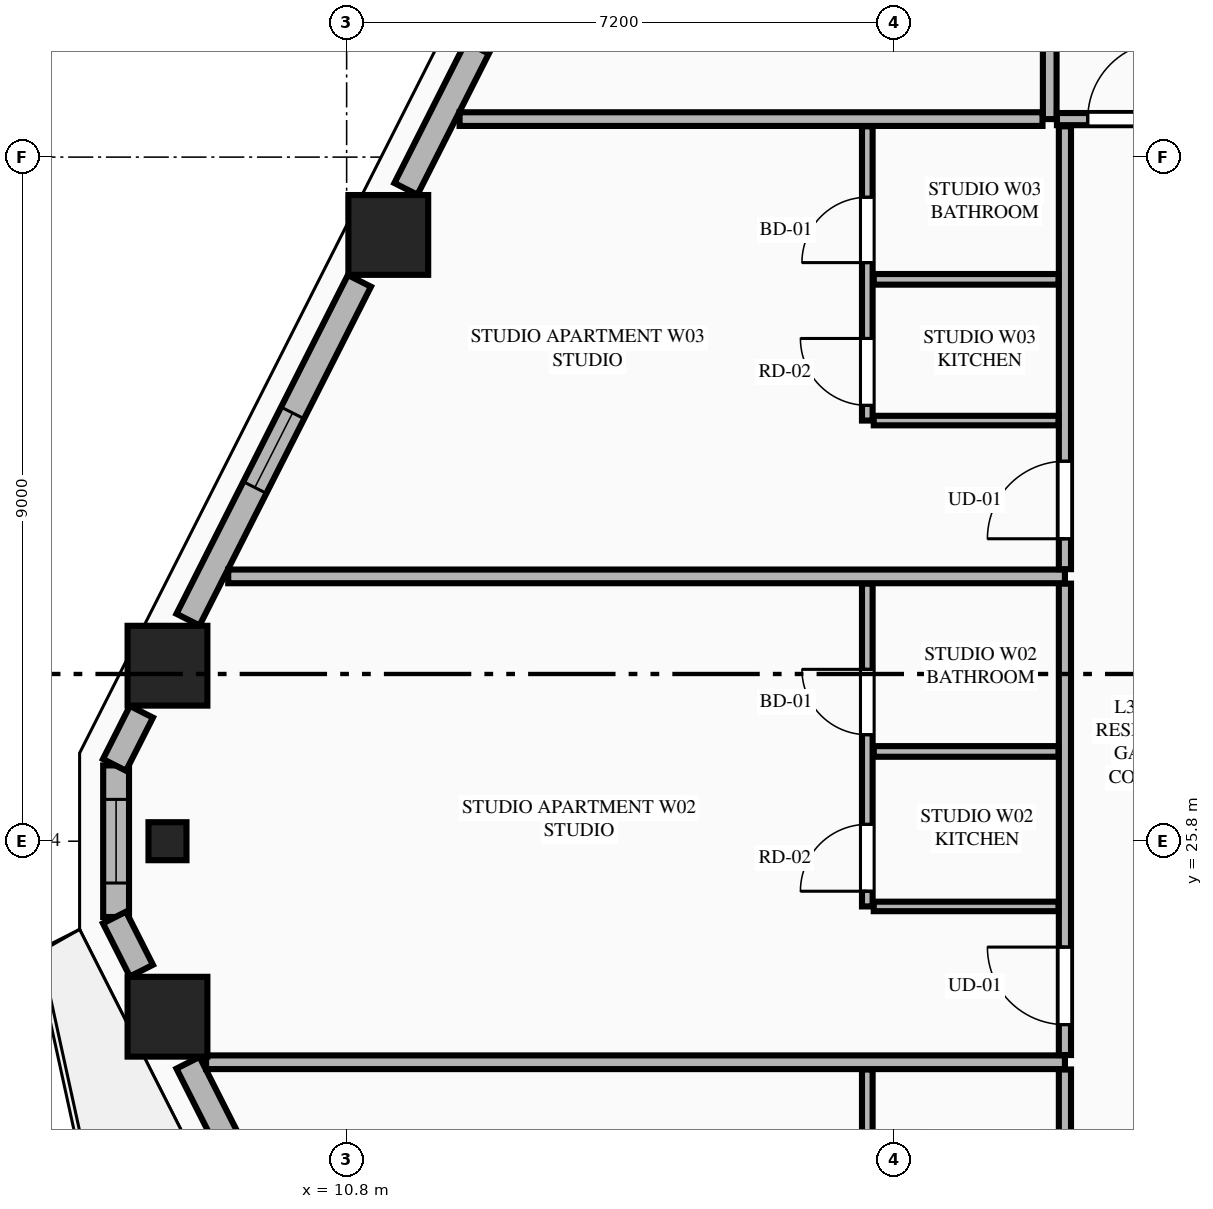
"""IFC4 building model, lengths in metres.
Left out: names, types, materials, properties, quantities, classifications, styles, units other than length and angle.
Written with IfcOpenShell. Run it as: python <this file> out.ifc"""

import sys

from ifc_helpers import new_model, si_unit, direction, frame, frame_2d, origin, origin_2d, place, context, subcontext, project, spatial, rectangle, extrude, element, fill, save


model = new_model("IFC4")
c1 = context("Model", 3, precision=1e-05, world=origin(), true_north=direction((0.0, 1.0)))
c2 = subcontext(c1, "Body", "Model", "MODEL_VIEW")
j1 = project(units=[si_unit("LENGTHUNIT", "METRE"), si_unit("PLANEANGLEUNIT", "RADIAN")], contexts=[c1])
p1 = place(None, origin())
s1 = spatial("IfcSite", under=j1, at=p1, CompositionType="ELEMENT")
p2 = place(p1, origin())
s2 = spatial("IfcBuilding", under=s1, at=p2, CompositionType="ELEMENT")
p3 = place(p2, frame((0.0, 0.0, 133.9)))
s3 = spatial("IfcBuildingStorey", under=s2, at=p3, CompositionType="ELEMENT", Elevation=133.9)
for number, where, z_axis, x_axis in (
    (1, (11.348, 33.776, 0.0), (0.0, 0.0, 1.0), (1.0, 0.0, 0.0)),
    (2, (8.443, 28.109, 0.0), (0.0, 0.0, 1.0), (1.0, 0.0, 0.0)),
    (3, (8.443, 23.491, 0.0), (0.0, 0.0, 1.0), (1.0, 0.0, 0.0)),
):
    element("IfcColumn", number, at=place(p3, frame(where, z_axis=z_axis, x_axis=x_axis)), inside=s3, PredefinedType="COLUMN", context=c2, shape_type="SweptSolid", body=[
        extrude(rectangle(XDim=1.05, YDim=1.05, at=origin_2d()), origin(), (0.0, 0.0, 1.0), 3.55),
    ])
p4 = place(p3, frame((8.443, 25.8, 0.0), z_axis=(0.0, 0.0, 1.0), x_axis=(0.0, -1.0, 0.0)))
e4 = element("IfcColumn", 4, at=p4, inside=s3, PredefinedType="PILASTER", context=c2, shape_type="SweptSolid", body=[
    extrude(rectangle(XDim=0.5, YDim=0.35, at=origin_2d()), origin(), (0.0, 0.0, 1.0), 3.55),
])
p5 = place(p3, frame((7.767, 26.797, 0.0), z_axis=(0.0, 0.0, 1.0), x_axis=(0.0, -1.0, 0.0)))
e5 = element("IfcWall", 5, at=p5, inside=s3, PredefinedType="STANDARD", context=c2, shape_type="SweptSolid", body=[
    extrude(rectangle(XDim=1.994, YDim=0.34, at=frame_2d((0.997, 0.0))), origin(), (0.0, 0.0, 1.0), 3.34),
])
p6 = place(p5, frame((0.447, 0.0, 0.75)))
e6 = element("IfcOpeningElement", 6, at=p6, cuts=e5, PredefinedType="OPENING", context=c2, shape_type="SweptSolid", body=[
    extrude(rectangle(XDim=1.1, YDim=2.0, at=frame_2d((0.55, 1.0))), frame((0.0, 0.18, 0.0), z_axis=(0.0, -1.0, 0.0), x_axis=(1.0, 0.0, 0.0)), (0.0, 0.0, 1.0), 0.36),
])
p7 = place(p3, frame((13.937, 39.039, 0.0), z_axis=(0.0, 0.0, 1.0), x_axis=(-0.451567731634, -0.892236842855, 0.0)))
e7 = element("IfcWall", 7, at=p7, inside=s3, PredefinedType="STANDARD", context=c2, shape_type="SweptSolid", body=[
    extrude(rectangle(XDim=5.219, YDim=0.34, at=frame_2d((2.61, 0.0))), origin(), (0.0, 0.0, 1.0), 2.797),
])
p8 = place(p7, frame((2.06, 0.0, 0.75)))
e8 = element("IfcOpeningElement", 8, at=p8, cuts=e7, PredefinedType="OPENING", context=c2, shape_type="SweptSolid", body=[
    extrude(rectangle(XDim=1.1, YDim=1.897, at=frame_2d((0.55, 0.948))), frame((0.0, 0.18, 0.0), z_axis=(0.0, -1.0, 0.0), x_axis=(1.0, 0.0, 0.0)), (0.0, 0.0, 1.0), 0.36),
])
p9 = place(p3, frame((10.968, 33.172, 0.0), z_axis=(0.0, 0.0, 1.0), x_axis=(-0.451470533039, -0.892286029139, 0.0)))
e9 = element("IfcWall", 9, at=p9, inside=s3, PredefinedType="STANDARD", context=c2, shape_type="SweptSolid", body=[
    extrude(rectangle(XDim=4.995, YDim=0.34, at=frame_2d((2.498, 0.0))), origin(), (0.0, 0.0, 1.0), 2.797),
])
p10 = place(p9, frame((1.947, 0.0, 0.75)))
e10 = element("IfcOpeningElement", 10, at=p10, cuts=e9, PredefinedType="OPENING", context=c2, shape_type="SweptSolid", body=[
    extrude(rectangle(XDim=1.1, YDim=1.897, at=frame_2d((0.55, 0.948))), frame((0.0, 0.18, 0.0), z_axis=(0.0, -1.0, 0.0), x_axis=(1.0, 0.0, 0.0)), (0.0, 0.0, 1.0), 0.36),
])
for number, where, z_axis, x_axis in (
    (11, (8.1, 27.503, 0.0), (0.0, 0.0, 1.0), (-0.452, -0.892, 0.0)),
    (12, (7.746, 24.796, 0.0), (0.0, 0.0, 1.0), (0.452, -0.892, 0.0)),
):
    element("IfcWall", number, at=place(p3, frame(where, z_axis=z_axis, x_axis=x_axis)), inside=s3, PredefinedType="STANDARD", context=c2, shape_type="SweptSolid", body=[
        extrude(rectangle(XDim=0.783, YDim=0.34, at=frame_2d((0.392, 0.0))), origin(), (0.0, 0.0, 1.0), 3.34),
    ])
p11 = place(p3, frame((8.713, 22.885, 0.0), z_axis=(0.0, 0.0, 1.0), x_axis=(0.451470533039, -0.892286029139, 0.0)))
e13 = element("IfcWall", 13, at=p11, inside=s3, PredefinedType="STANDARD", context=c2, shape_type="SweptSolid", body=[
    extrude(rectangle(XDim=4.995, YDim=0.34, at=frame_2d((2.498, 0.0))), origin(), (0.0, 0.0, 1.0), 2.797),
])
p12 = place(p11, frame((1.947, 0.0, 0.75)))
e14 = element("IfcOpeningElement", 14, at=p12, cuts=e13, PredefinedType="OPENING", context=c2, shape_type="SweptSolid", body=[
    extrude(rectangle(XDim=1.1, YDim=1.897, at=frame_2d((0.55, 0.948))), frame((0.0, 0.18, 0.0), z_axis=(0.0, -1.0, 0.0), x_axis=(1.0, 0.0, 0.0)), (0.0, 0.0, 1.0), 0.36),
])
p13 = place(p3, frame((20.05, 35.3, 0.0), z_axis=(0.0, 0.0, 1.0), x_axis=(0.0, 1.0, 0.0)))
e15 = element("IfcWall", 15, at=p13, inside=s3, PredefinedType="PARTITIONING", context=c2, shape_type="SweptSolid", body=[
    extrude(rectangle(XDim=12.195, YDim=0.18, at=frame_2d((6.098, 0.0))), origin(), (0.0, 0.0, 1.0), 3.34),
])
p14 = place(p3, frame((20.145, 35.3, 0.0), z_axis=(0.0, 0.0, 1.0), x_axis=(1.0, 0.0, 0.0)))
e16 = element("IfcWall", 16, at=p14, inside=s3, PredefinedType="PARTITIONING", context=c2, shape_type="SweptSolid", body=[
    extrude(rectangle(XDim=8.328, YDim=0.16, at=frame_2d((4.164, 0.0))), origin(), (0.0, 0.0, 1.0), 3.34),
])
p15 = place(p14, frame((0.405, 0.0, 0.0)))
e17 = element("IfcOpeningElement", 17, at=p15, cuts=e16, PredefinedType="OPENING", context=c2, shape_type="SweptSolid", body=[
    extrude(rectangle(XDim=1.02, YDim=2.25, at=frame_2d((0.51, 1.125))), frame((0.0, 0.09, 0.0), z_axis=(0.0, -1.0, 0.0), x_axis=(1.0, 0.0, 0.0)), (0.0, 0.0, 1.0), 0.18),
])
p16 = place(p3, frame((12.286, 35.3, 0.0), z_axis=(0.0, 0.0, 1.0), x_axis=(1.0, 0.0, 0.0)))
e18 = element("IfcWall", 18, at=p16, inside=s3, PredefinedType="PARTITIONING", context=c2, shape_type="SweptSolid", body=[
    extrude(rectangle(XDim=7.669, YDim=0.18, at=frame_2d((3.834, 0.0))), origin(), (0.0, 0.0, 1.0), 3.34),
])
p17 = place(p3, frame((20.25, 16.595, 0.0), z_axis=(0.0, 0.0, 1.0), x_axis=(0.0, 1.0, 0.0)))
e19 = element("IfcWall", 19, at=p17, inside=s3, PredefinedType="PARTITIONING", context=c2, shape_type="SweptSolid", body=[
    extrude(rectangle(XDim=6.202, YDim=0.16, at=frame_2d((3.101, 0.0))), origin(), (0.0, 0.0, 1.0), 3.34),
])
p18 = place(p17, frame((0.4, 0.0, 0.0)))
e20 = element("IfcOpeningElement", 20, at=p18, cuts=e19, PredefinedType="OPENING", context=c2, shape_type="SweptSolid", body=[
    extrude(rectangle(XDim=1.02, YDim=2.25, at=frame_2d((0.51, 1.125))), frame((0.0, 0.09, 0.0), z_axis=(0.0, -1.0, 0.0), x_axis=(1.0, 0.0, 0.0)), (0.0, 0.0, 1.0), 0.18),
])
p19 = place(p3, frame((17.65, 18.55, 0.0), z_axis=(0.0, 0.0, 1.0), x_axis=(0.0, 1.0, 0.0)))
e21 = element("IfcWall", 21, at=p19, inside=s3, PredefinedType="PLUMBINGWALL", context=c2, shape_type="SweptSolid", body=[
    extrude(rectangle(XDim=4.247, YDim=0.14, at=frame_2d((2.124, 0.0))), origin(), (0.0, 0.0, 1.0), 3.34),
])
p20 = place(p19, frame((2.259, 0.0, 0.0)))
e22 = element("IfcOpeningElement", 22, at=p20, cuts=e21, PredefinedType="OPENING", context=c2, shape_type="SweptSolid", body=[
    extrude(rectangle(XDim=0.86, YDim=2.1, at=frame_2d((0.43, 1.05))), frame((0.0, 0.08, 0.0), z_axis=(0.0, -1.0, 0.0), x_axis=(1.0, 0.0, 0.0)), (0.0, 0.0, 1.0), 0.16),
])
p21 = place(p19, frame((0.2, 0.0, 0.0)))
e23 = element("IfcOpeningElement", 23, at=p21, cuts=e21, PredefinedType="OPENING", context=c2, shape_type="SweptSolid", body=[
    extrude(rectangle(XDim=0.88, YDim=2.15, at=frame_2d((0.44, 1.075))), frame((0.0, 0.08, 0.0), z_axis=(0.0, -1.0, 0.0), x_axis=(1.0, 0.0, 0.0)), (0.0, 0.0, 1.0), 0.16),
])
p22 = place(p3, frame((8.951, 22.892, 0.0), z_axis=(0.0, 0.0, 1.0), x_axis=(1.0, 0.0, 0.0)))
e24 = element("IfcWall", 24, at=p22, inside=s3, PredefinedType="PARTITIONING", context=c2, shape_type="SweptSolid", body=[
    extrude(rectangle(XDim=11.299, YDim=0.18, at=frame_2d((5.649, 0.0))), origin(), (0.0, 0.0, 1.0), 3.34),
])
p23 = place(p3, frame((20.25, 22.987, 0.0), z_axis=(0.0, 0.0, 1.0), x_axis=(0.0, 1.0, 0.0)))
e25 = element("IfcWall", 25, at=p23, inside=s3, PredefinedType="PARTITIONING", context=c2, shape_type="SweptSolid", body=[
    extrude(rectangle(XDim=6.202, YDim=0.16, at=frame_2d((3.101, 0.0))), origin(), (0.0, 0.0, 1.0), 3.34),
])
p24 = place(p23, frame((0.4, 0.0, 0.0)))
e26 = element("IfcOpeningElement", 26, at=p24, cuts=e25, PredefinedType="OPENING", context=c2, shape_type="SweptSolid", body=[
    extrude(rectangle(XDim=1.02, YDim=2.25, at=frame_2d((0.51, 1.125))), frame((0.0, 0.09, 0.0), z_axis=(0.0, -1.0, 0.0), x_axis=(1.0, 0.0, 0.0)), (0.0, 0.0, 1.0), 0.18),
])
p25 = place(p3, frame((17.735, 24.942, 0.0), z_axis=(0.0, 0.0, 1.0), x_axis=(1.0, 0.0, 0.0)))
e27 = element("IfcWall", 27, at=p25, inside=s3, PredefinedType="PARTITIONING", context=c2, shape_type="SweptSolid", body=[
    extrude(rectangle(XDim=2.43, YDim=0.125, at=frame_2d((1.215, 0.0))), origin(), (0.0, 0.0, 1.0), 3.34),
])
p26 = place(p3, frame((17.65, 24.942, 0.0), z_axis=(0.0, 0.0, 1.0), x_axis=(0.0, 1.0, 0.0)))
e28 = element("IfcWall", 28, at=p26, inside=s3, PredefinedType="PLUMBINGWALL", context=c2, shape_type="SweptSolid", body=[
    extrude(rectangle(XDim=4.247, YDim=0.14, at=frame_2d((2.124, 0.0))), origin(), (0.0, 0.0, 1.0), 3.34),
])
p27 = place(p26, frame((2.259, 0.0, 0.0)))
e29 = element("IfcOpeningElement", 29, at=p27, cuts=e28, PredefinedType="OPENING", context=c2, shape_type="SweptSolid", body=[
    extrude(rectangle(XDim=0.86, YDim=2.1, at=frame_2d((0.43, 1.05))), frame((0.0, 0.08, 0.0), z_axis=(0.0, -1.0, 0.0), x_axis=(1.0, 0.0, 0.0)), (0.0, 0.0, 1.0), 0.16),
])
p28 = place(p26, frame((0.2, 0.0, 0.0)))
e30 = element("IfcOpeningElement", 30, at=p28, cuts=e28, PredefinedType="OPENING", context=c2, shape_type="SweptSolid", body=[
    extrude(rectangle(XDim=0.88, YDim=2.15, at=frame_2d((0.44, 1.075))), frame((0.0, 0.08, 0.0), z_axis=(0.0, -1.0, 0.0), x_axis=(1.0, 0.0, 0.0)), (0.0, 0.0, 1.0), 0.16),
])
p29 = place(p3, frame((17.735, 26.981, 0.0), z_axis=(0.0, 0.0, 1.0), x_axis=(1.0, 0.0, 0.0)))
e31 = element("IfcWall", 31, at=p29, inside=s3, PredefinedType="PLUMBINGWALL", context=c2, shape_type="SweptSolid", body=[
    extrude(rectangle(XDim=2.43, YDim=0.14, at=frame_2d((1.215, 0.0))), origin(), (0.0, 0.0, 1.0), 3.34),
])
p30 = place(p3, frame((9.242, 29.284, 0.0), z_axis=(0.0, 0.0, 1.0), x_axis=(1.0, 0.0, 0.0)))
e32 = element("IfcWall", 32, at=p30, inside=s3, PredefinedType="PARTITIONING", context=c2, shape_type="SweptSolid", body=[
    extrude(rectangle(XDim=11.008, YDim=0.18, at=frame_2d((5.504, 0.0))), origin(), (0.0, 0.0, 1.0), 3.34),
])
p31 = place(p3, frame((20.25, 29.379, 0.0), z_axis=(0.0, 0.0, 1.0), x_axis=(0.0, 1.0, 0.0)))
e33 = element("IfcWall", 33, at=p31, inside=s3, PredefinedType="PARTITIONING", context=c2, shape_type="SweptSolid", body=[
    extrude(rectangle(XDim=5.826, YDim=0.16, at=frame_2d((2.913, 0.0))), origin(), (0.0, 0.0, 1.0), 3.34),
])
p32 = place(p31, frame((0.4, 0.0, 0.0)))
e34 = element("IfcOpeningElement", 34, at=p32, cuts=e33, PredefinedType="OPENING", context=c2, shape_type="SweptSolid", body=[
    extrude(rectangle(XDim=1.02, YDim=2.25, at=frame_2d((0.51, 1.125))), frame((0.0, 0.09, 0.0), z_axis=(0.0, -1.0, 0.0), x_axis=(1.0, 0.0, 0.0)), (0.0, 0.0, 1.0), 0.18),
])
p33 = place(p3, frame((17.735, 31.334, 0.0), z_axis=(0.0, 0.0, 1.0), x_axis=(1.0, 0.0, 0.0)))
e35 = element("IfcWall", 35, at=p33, inside=s3, PredefinedType="PARTITIONING", context=c2, shape_type="SweptSolid", body=[
    extrude(rectangle(XDim=2.43, YDim=0.125, at=frame_2d((1.215, 0.0))), origin(), (0.0, 0.0, 1.0), 3.34),
])
p34 = place(p3, frame((17.65, 31.334, 0.0), z_axis=(0.0, 0.0, 1.0), x_axis=(0.0, 1.0, 0.0)))
e36 = element("IfcWall", 36, at=p34, inside=s3, PredefinedType="PLUMBINGWALL", context=c2, shape_type="SweptSolid", body=[
    extrude(rectangle(XDim=3.871, YDim=0.14, at=frame_2d((1.936, 0.0))), origin(), (0.0, 0.0, 1.0), 3.34),
])
p35 = place(p34, frame((2.078, 0.0, 0.0)))
e37 = element("IfcOpeningElement", 37, at=p35, cuts=e36, PredefinedType="OPENING", context=c2, shape_type="SweptSolid", body=[
    extrude(rectangle(XDim=0.86, YDim=2.1, at=frame_2d((0.43, 1.05))), frame((0.0, 0.08, 0.0), z_axis=(0.0, -1.0, 0.0), x_axis=(1.0, 0.0, 0.0)), (0.0, 0.0, 1.0), 0.16),
])
p36 = place(p34, frame((0.2, 0.0, 0.0)))
e38 = element("IfcOpeningElement", 38, at=p36, cuts=e36, PredefinedType="OPENING", context=c2, shape_type="SweptSolid", body=[
    extrude(rectangle(XDim=0.88, YDim=2.15, at=frame_2d((0.44, 1.075))), frame((0.0, 0.08, 0.0), z_axis=(0.0, -1.0, 0.0), x_axis=(1.0, 0.0, 0.0)), (0.0, 0.0, 1.0), 0.16),
])
p37 = place(p3, frame((17.735, 33.192, 0.0), z_axis=(0.0, 0.0, 1.0), x_axis=(1.0, 0.0, 0.0)))
e39 = element("IfcWall", 39, at=p37, inside=s3, PredefinedType="PLUMBINGWALL", context=c2, shape_type="SweptSolid", body=[
    extrude(rectangle(XDim=2.43, YDim=0.14, at=frame_2d((1.215, 0.0))), origin(), (0.0, 0.0, 1.0), 2.722),
])
p38 = place(p10, origin())
e40 = element("IfcWindow", 40, at=p38, inside=s3, PartitioningType="SINGLE_PANEL", PredefinedType="WINDOW", context=c2, shape_type="SweptSolid", body=[
    extrude(rectangle(XDim=1.1, YDim=1.897, at=frame_2d((0.55, 0.948))), frame((0.0, 0.03, 0.0), z_axis=(0.0, -1.0, 0.0), x_axis=(1.0, 0.0, 0.0)), (0.0, 0.0, 1.0), 0.06),
])
fill(e10, e40)
p39 = place(p15, origin())
e41 = element("IfcDoor", 41, at=p39, inside=s3, OperationType="SINGLE_SWING_RIGHT", PredefinedType="DOOR", context=c2, shape_type="SweptSolid", body=[
    extrude(rectangle(XDim=1.02, YDim=2.25, at=frame_2d((0.51, 1.125))), frame((0.0, 0.025, 0.0), z_axis=(0.0, -1.0, 0.0), x_axis=(1.0, 0.0, 0.0)), (0.0, 0.0, 1.0), 0.05),
])
fill(e17, e41)
p40 = place(p27, origin())
e42 = element("IfcDoor", 42, at=p40, inside=s3, OperationType="SINGLE_SWING_RIGHT", PredefinedType="DOOR", context=c2, shape_type="SweptSolid", body=[
    extrude(rectangle(XDim=0.86, YDim=2.1, at=frame_2d((0.43, 1.05))), frame((0.0, 0.025, 0.0), z_axis=(0.0, -1.0, 0.0), x_axis=(1.0, 0.0, 0.0)), (0.0, 0.0, 1.0), 0.05),
])
fill(e29, e42)
p41 = place(p24, origin())
e43 = element("IfcDoor", 43, at=p41, inside=s3, OperationType="SINGLE_SWING_RIGHT", PredefinedType="DOOR", context=c2, shape_type="SweptSolid", body=[
    extrude(rectangle(XDim=1.02, YDim=2.25, at=frame_2d((0.51, 1.125))), frame((0.0, 0.025, 0.0), z_axis=(0.0, -1.0, 0.0), x_axis=(1.0, 0.0, 0.0)), (0.0, 0.0, 1.0), 0.05),
])
fill(e26, e43)
p42 = place(p28, origin())
e44 = element("IfcDoor", 44, at=p42, inside=s3, OperationType="SINGLE_SWING_LEFT", PredefinedType="DOOR", context=c2, shape_type="SweptSolid", body=[
    extrude(rectangle(XDim=0.88, YDim=2.15, at=frame_2d((0.44, 1.075))), frame((0.0, 0.025, 0.0), z_axis=(0.0, -1.0, 0.0), x_axis=(1.0, 0.0, 0.0)), (0.0, 0.0, 1.0), 0.05),
])
fill(e30, e44)
p43 = place(p35, origin())
e45 = element("IfcDoor", 45, at=p43, inside=s3, OperationType="SINGLE_SWING_LEFT", PredefinedType="DOOR", context=c2, shape_type="SweptSolid", body=[
    extrude(rectangle(XDim=0.86, YDim=2.1, at=frame_2d((0.43, 1.05))), frame((0.0, 0.025, 0.0), z_axis=(0.0, -1.0, 0.0), x_axis=(1.0, 0.0, 0.0)), (0.0, 0.0, 1.0), 0.05),
])
fill(e37, e45)
p44 = place(p32, origin())
e46 = element("IfcDoor", 46, at=p44, inside=s3, OperationType="SINGLE_SWING_LEFT", PredefinedType="DOOR", context=c2, shape_type="SweptSolid", body=[
    extrude(rectangle(XDim=1.02, YDim=2.25, at=frame_2d((0.51, 1.125))), frame((0.0, 0.025, 0.0), z_axis=(0.0, -1.0, 0.0), x_axis=(1.0, 0.0, 0.0)), (0.0, 0.0, 1.0), 0.05),
])
fill(e34, e46)
p45 = place(p36, origin())
e47 = element("IfcDoor", 47, at=p45, inside=s3, OperationType="SINGLE_SWING_RIGHT", PredefinedType="DOOR", context=c2, shape_type="SweptSolid", body=[
    extrude(rectangle(XDim=0.88, YDim=2.15, at=frame_2d((0.44, 1.075))), frame((0.0, 0.025, 0.0), z_axis=(0.0, -1.0, 0.0), x_axis=(1.0, 0.0, 0.0)), (0.0, 0.0, 1.0), 0.05),
])
fill(e38, e47)
p46 = place(p6, origin())
e48 = element("IfcWindow", 48, at=p46, inside=s3, PartitioningType="SINGLE_PANEL", PredefinedType="WINDOW", context=c2, shape_type="SweptSolid", body=[
    extrude(rectangle(XDim=1.1, YDim=2.0, at=frame_2d((0.55, 1.0))), frame((0.0, 0.03, 0.0), z_axis=(0.0, -1.0, 0.0), x_axis=(1.0, 0.0, 0.0)), (0.0, 0.0, 1.0), 0.06),
])
fill(e6, e48)
save(model, sys.argv[1])
